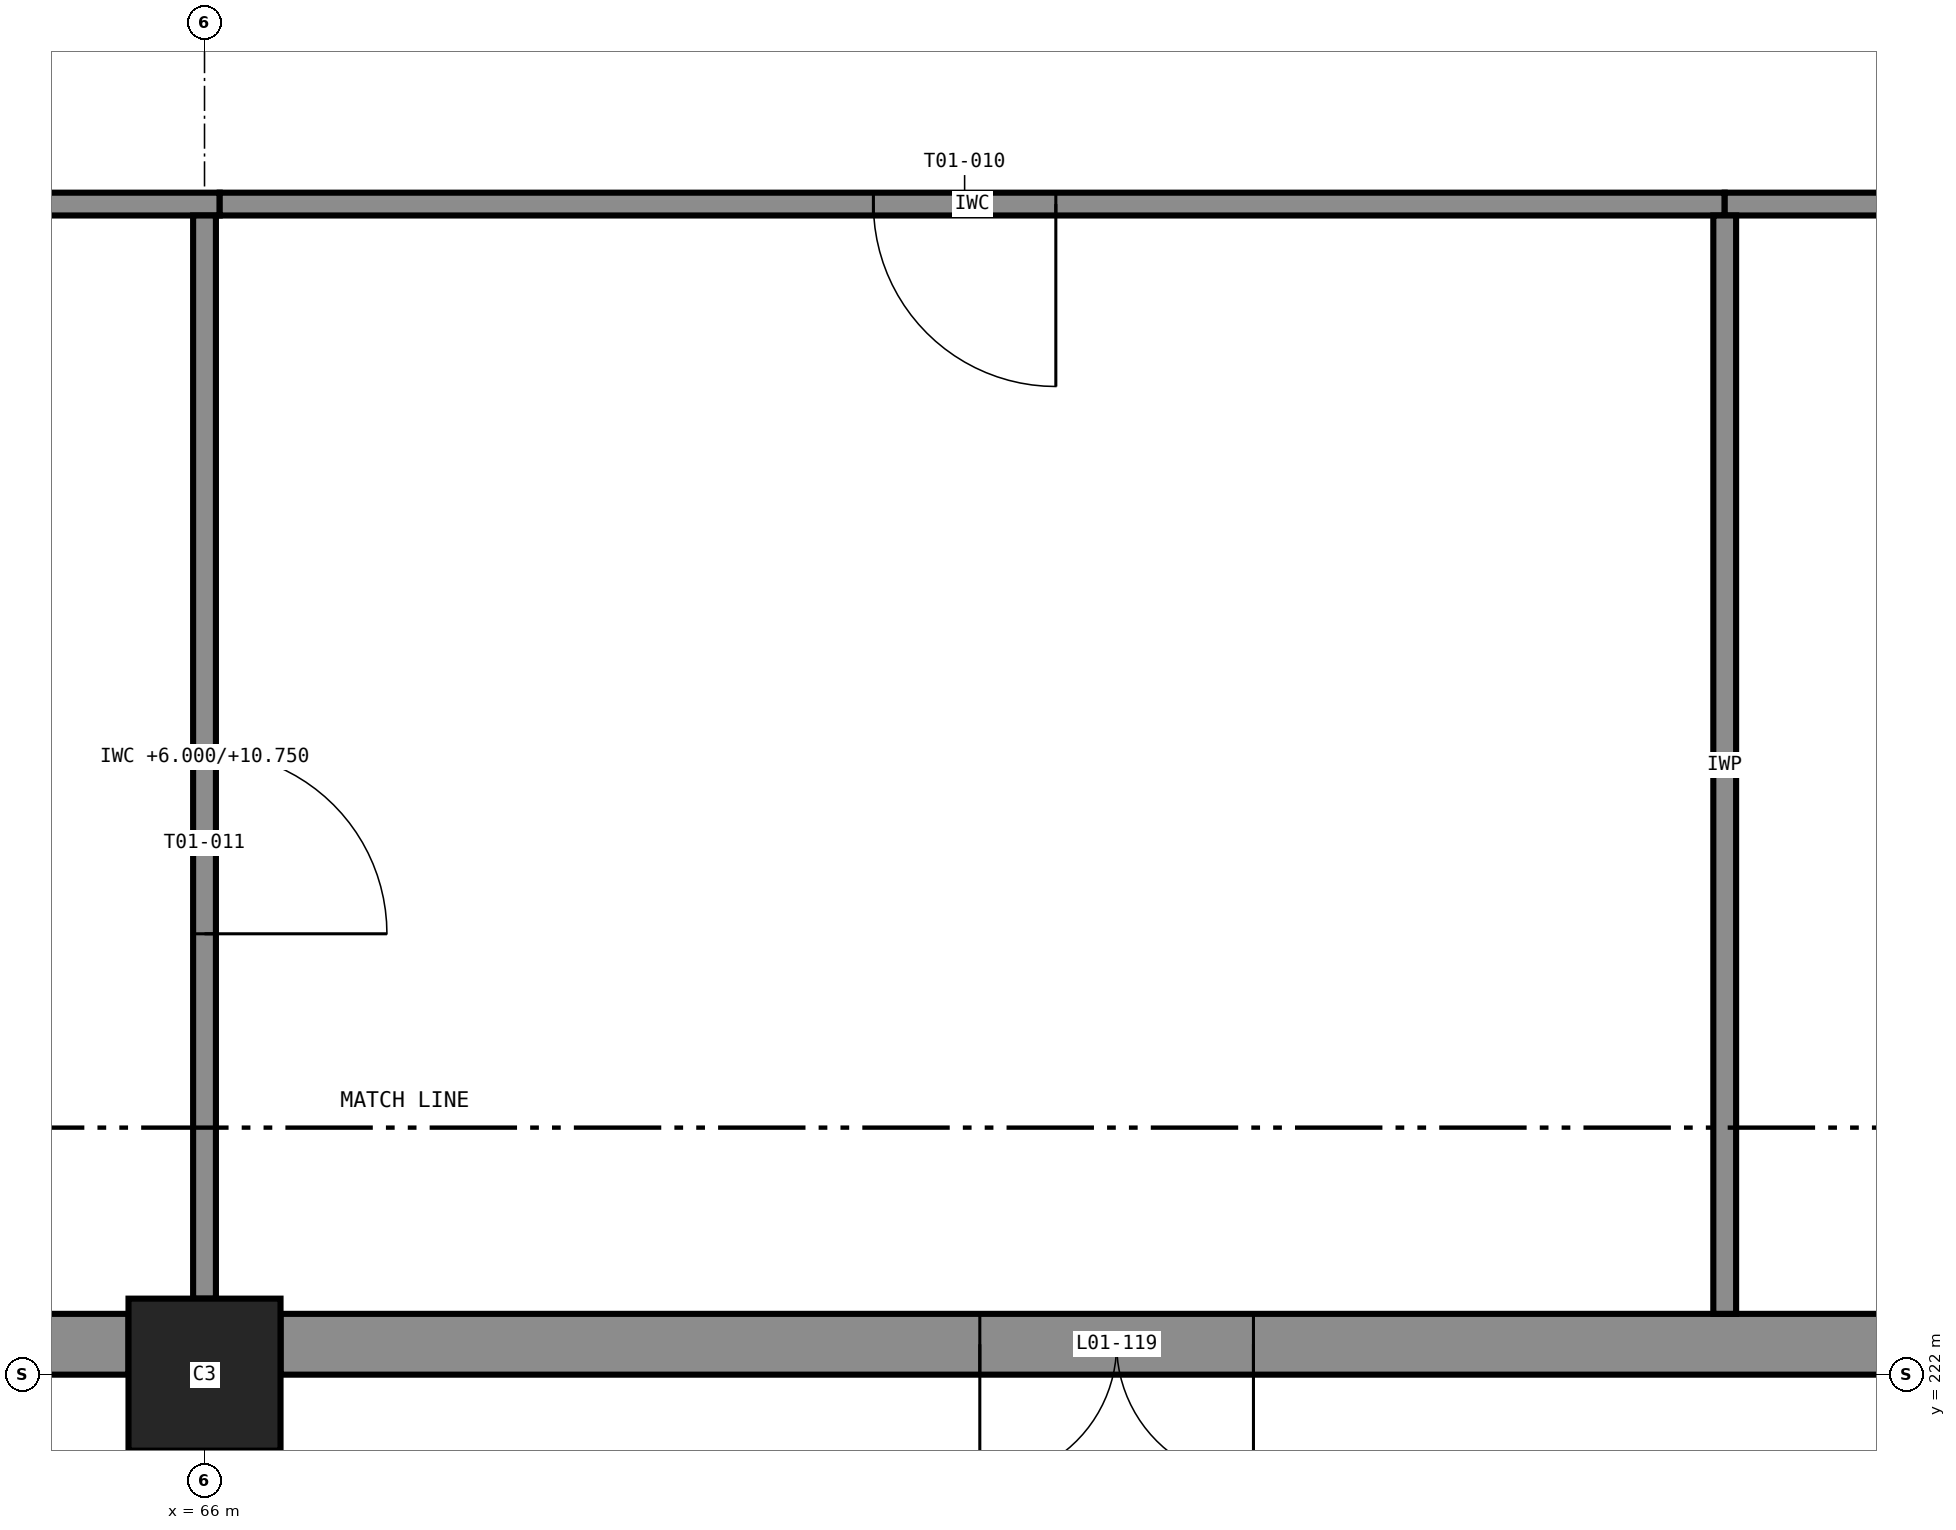
"""IFC4 building model, lengths in metres.
Left out: names, types, materials, properties, quantities, classifications, styles, units other than length and angle.
Written with IfcOpenShell. Run it as: python <this file> out.ifc"""

import sys

from ifc_helpers import new_model, si_unit, direction, frame, frame_2d, origin, origin_2d, place, context, subcontext, project, spatial, rectangle, extrude, element, fill, save


model = new_model("IFC4")
c1 = context("Model", 3, precision=1e-05, world=origin(), true_north=direction((0.0, 1.0)))
c2 = subcontext(c1, "Body", "Model", "MODEL_VIEW")
j1 = project(units=[si_unit("LENGTHUNIT", "METRE"), si_unit("PLANEANGLEUNIT", "RADIAN")], contexts=[c1])
p1 = place(None, origin())
s1 = spatial("IfcSite", under=j1, at=p1, CompositionType="ELEMENT")
p2 = place(p1, origin())
s2 = spatial("IfcBuilding", under=s1, at=p2, CompositionType="ELEMENT")
p3 = place(p2, frame((0.0, 0.0, 6.0)))
s3 = spatial("IfcBuildingStorey", under=s2, at=p3, CompositionType="ELEMENT", Elevation=6.0)
p4 = place(p3, frame((66.0, 222.0, 0.0), z_axis=(0.0, 0.0, 1.0), x_axis=(1.0, 0.0, 0.0)))
e1 = element("IfcColumn", 1, at=p4, inside=s3, PredefinedType="COLUMN", context=c2, shape_type="SweptSolid", body=[
    extrude(rectangle(XDim=1.0, YDim=1.0, at=origin_2d()), origin(), (0.0, 0.0, 1.0), 6.0),
])
p5 = place(p3, frame((54.5, 222.2, 0.0), z_axis=(0.0, 0.0, 1.0), x_axis=(1.0, 0.0, 0.0)))
e2 = element("IfcWall", 2, at=p5, inside=s3, PredefinedType="SOLIDWALL", context=c2, shape_type="SweptSolid", body=[
    extrude(rectangle(XDim=11.0, YDim=0.4, at=frame_2d((5.5, 0.0))), origin(), (0.0, 0.0, 1.0), 4.75),
])
p6 = place(p5, frame((4.6, 0.0, 0.0)))
e3 = element("IfcOpeningElement", 3, at=p6, cuts=e2, PredefinedType="OPENING", context=c2, shape_type="SweptSolid", body=[
    extrude(rectangle(XDim=1.8, YDim=2.1, at=frame_2d((0.9, 1.05))), frame((0.0, 0.21, 0.0), z_axis=(0.0, -1.0, 0.0), x_axis=(1.0, 0.0, 0.0)), (0.0, 0.0, 1.0), 0.42),
])
p7 = place(p3, frame((66.5, 222.2, 0.0), z_axis=(0.0, 0.0, 1.0), x_axis=(1.0, 0.0, 0.0)))
e4 = element("IfcWall", 4, at=p7, inside=s3, PredefinedType="SOLIDWALL", context=c2, shape_type="SweptSolid", body=[
    extrude(rectangle(XDim=23.5, YDim=0.4, at=frame_2d((11.75, 0.0))), origin(), (0.0, 0.0, 1.0), 4.75),
])
p8 = place(p7, frame((4.6, 0.0, 0.0)))
e5 = element("IfcOpeningElement", 5, at=p8, cuts=e4, PredefinedType="OPENING", context=c2, shape_type="SweptSolid", body=[
    extrude(rectangle(XDim=1.8, YDim=2.1, at=frame_2d((0.9, 1.05))), frame((0.0, 0.21, 0.0), z_axis=(0.0, -1.0, 0.0), x_axis=(1.0, 0.0, 0.0)), (0.0, 0.0, 1.0), 0.42),
])
p9 = place(p3, frame((66.1, 229.7, 0.0), z_axis=(0.0, 0.0, 1.0), x_axis=(-1.0, 0.0, 0.0)))
e6 = element("IfcWall", 6, at=p9, inside=s3, PredefinedType="PARTITIONING", context=c2, shape_type="SweptSolid", body=[
    extrude(rectangle(XDim=23.7, YDim=0.15, at=frame_2d((11.85, 0.0))), origin(), (0.0, 0.0, 1.0), 5.75),
])
p10 = place(p9, frame((15.6, 0.0, 0.0)))
e7 = element("IfcOpeningElement", 7, at=p10, cuts=e6, PredefinedType="OPENING", context=c2, shape_type="SweptSolid", body=[
    extrude(rectangle(XDim=1.0, YDim=2.1, at=frame_2d((0.5, 1.05))), frame((0.0, 0.085, 0.0), z_axis=(0.0, -1.0, 0.0), x_axis=(1.0, 0.0, 0.0)), (0.0, 0.0, 1.0), 0.17),
])
p11 = place(p9, frame((6.6, 0.0, 0.0)))
e8 = element("IfcOpeningElement", 8, at=p11, cuts=e6, PredefinedType="OPENING", context=c2, shape_type="SweptSolid", body=[
    extrude(rectangle(XDim=1.0, YDim=2.1, at=frame_2d((0.5, 1.05))), frame((0.0, 0.085, 0.0), z_axis=(0.0, -1.0, 0.0), x_axis=(1.0, 0.0, 0.0)), (0.0, 0.0, 1.0), 0.17),
])
p12 = place(p3, frame((76.0, 229.7, 0.0), z_axis=(0.0, 0.0, 1.0), x_axis=(-1.0, 0.0, 0.0)))
e9 = element("IfcWall", 9, at=p12, inside=s3, PredefinedType="PARTITIONING", context=c2, shape_type="SweptSolid", body=[
    extrude(rectangle(XDim=9.9, YDim=0.15, at=frame_2d((4.95, 0.0))), origin(), (0.0, 0.0, 1.0), 5.75),
])
p13 = place(p12, frame((4.4, 0.0, 0.0)))
e10 = element("IfcOpeningElement", 10, at=p13, cuts=e9, PredefinedType="OPENING", context=c2, shape_type="SweptSolid", body=[
    extrude(rectangle(XDim=1.2, YDim=2.1, at=frame_2d((0.6, 1.05))), frame((0.0, 0.085, 0.0), z_axis=(0.0, -1.0, 0.0), x_axis=(1.0, 0.0, 0.0)), (0.0, 0.0, 1.0), 0.17),
])
p14 = place(p3, frame((66.0, 229.625, 0.0), z_axis=(0.0, 0.0, 1.0), x_axis=(0.0, -1.0, 0.0)))
e11 = element("IfcWall", 11, at=p14, inside=s3, PredefinedType="PARTITIONING", context=c2, shape_type="SweptSolid", body=[
    extrude(rectangle(XDim=7.125, YDim=0.15, at=frame_2d((3.562, 0.0))), origin(), (0.0, 0.0, 1.0), 4.75),
])
p15 = place(p14, frame((3.525, 0.0, 0.0)))
e12 = element("IfcOpeningElement", 12, at=p15, cuts=e11, PredefinedType="OPENING", context=c2, shape_type="SweptSolid", body=[
    extrude(rectangle(XDim=1.2, YDim=2.1, at=frame_2d((0.6, 1.05))), frame((0.0, 0.085, 0.0), z_axis=(0.0, -1.0, 0.0), x_axis=(1.0, 0.0, 0.0)), (0.0, 0.0, 1.0), 0.17),
])
p16 = place(p3, frame((79.6, 229.7, 0.0), z_axis=(0.0, 0.0, 1.0), x_axis=(-1.0, 0.0, 0.0)))
e13 = element("IfcWall", 13, at=p16, inside=s3, PredefinedType="PARTITIONING", context=c2, shape_type="SweptSolid", body=[
    extrude(rectangle(XDim=3.6, YDim=0.15, at=frame_2d((1.8, 0.0))), origin(), (0.0, 0.0, 1.0), 5.75),
])
p17 = place(p16, frame((1.4, 0.0, 0.0)))
e14 = element("IfcOpeningElement", 14, at=p17, cuts=e13, PredefinedType="OPENING", context=c2, shape_type="SweptSolid", body=[
    extrude(rectangle(XDim=0.9, YDim=2.1, at=frame_2d((0.45, 1.05))), frame((0.0, 0.085, 0.0), z_axis=(0.0, -1.0, 0.0), x_axis=(1.0, 0.0, 0.0)), (0.0, 0.0, 1.0), 0.17),
])
p18 = place(p3, frame((76.0, 222.4, 0.0), z_axis=(0.0, 0.0, 1.0), x_axis=(0.0, 1.0, 0.0)))
e15 = element("IfcWall", 15, at=p18, inside=s3, PredefinedType="PARTITIONING", context=c2, shape_type="SweptSolid", body=[
    extrude(rectangle(XDim=7.225, YDim=0.15, at=frame_2d((3.613, 0.0))), origin(), (0.0, 0.0, 1.0), 5.75),
])
p19 = place(p8, frame((1.8, 0.0, 0.0), z_axis=(0.0, 0.0, 1.0), x_axis=(-1.0, 0.0, 0.0)))
e16 = element("IfcDoor", 16, at=p19, inside=s3, OperationType="DOUBLE_DOOR_SINGLE_SWING", PredefinedType="DOOR", context=c2, shape_type="SweptSolid", body=[
    extrude(rectangle(XDim=1.8, YDim=2.1, at=frame_2d((0.9, 1.05))), frame((0.0, 0.025, 0.0), z_axis=(0.0, -1.0, 0.0), x_axis=(1.0, 0.0, 0.0)), (0.0, 0.0, 1.0), 0.05),
])
fill(e5, e16)
p20 = place(p13, origin())
e17 = element("IfcDoor", 17, at=p20, inside=s3, OperationType="SINGLE_SWING_LEFT", PredefinedType="DOOR", context=c2, shape_type="SweptSolid", body=[
    extrude(rectangle(XDim=1.2, YDim=2.1, at=frame_2d((0.6, 1.05))), frame((0.0, 0.025, 0.0), z_axis=(0.0, -1.0, 0.0), x_axis=(1.0, 0.0, 0.0)), (0.0, 0.0, 1.0), 0.05),
])
fill(e10, e17)
p21 = place(p15, origin())
e18 = element("IfcDoor", 18, at=p21, inside=s3, OperationType="SINGLE_SWING_RIGHT", PredefinedType="DOOR", context=c2, shape_type="SweptSolid", body=[
    extrude(rectangle(XDim=1.2, YDim=2.1, at=frame_2d((0.6, 1.05))), frame((0.0, 0.025, 0.0), z_axis=(0.0, -1.0, 0.0), x_axis=(1.0, 0.0, 0.0)), (0.0, 0.0, 1.0), 0.05),
])
fill(e12, e18)
save(model, sys.argv[1])
